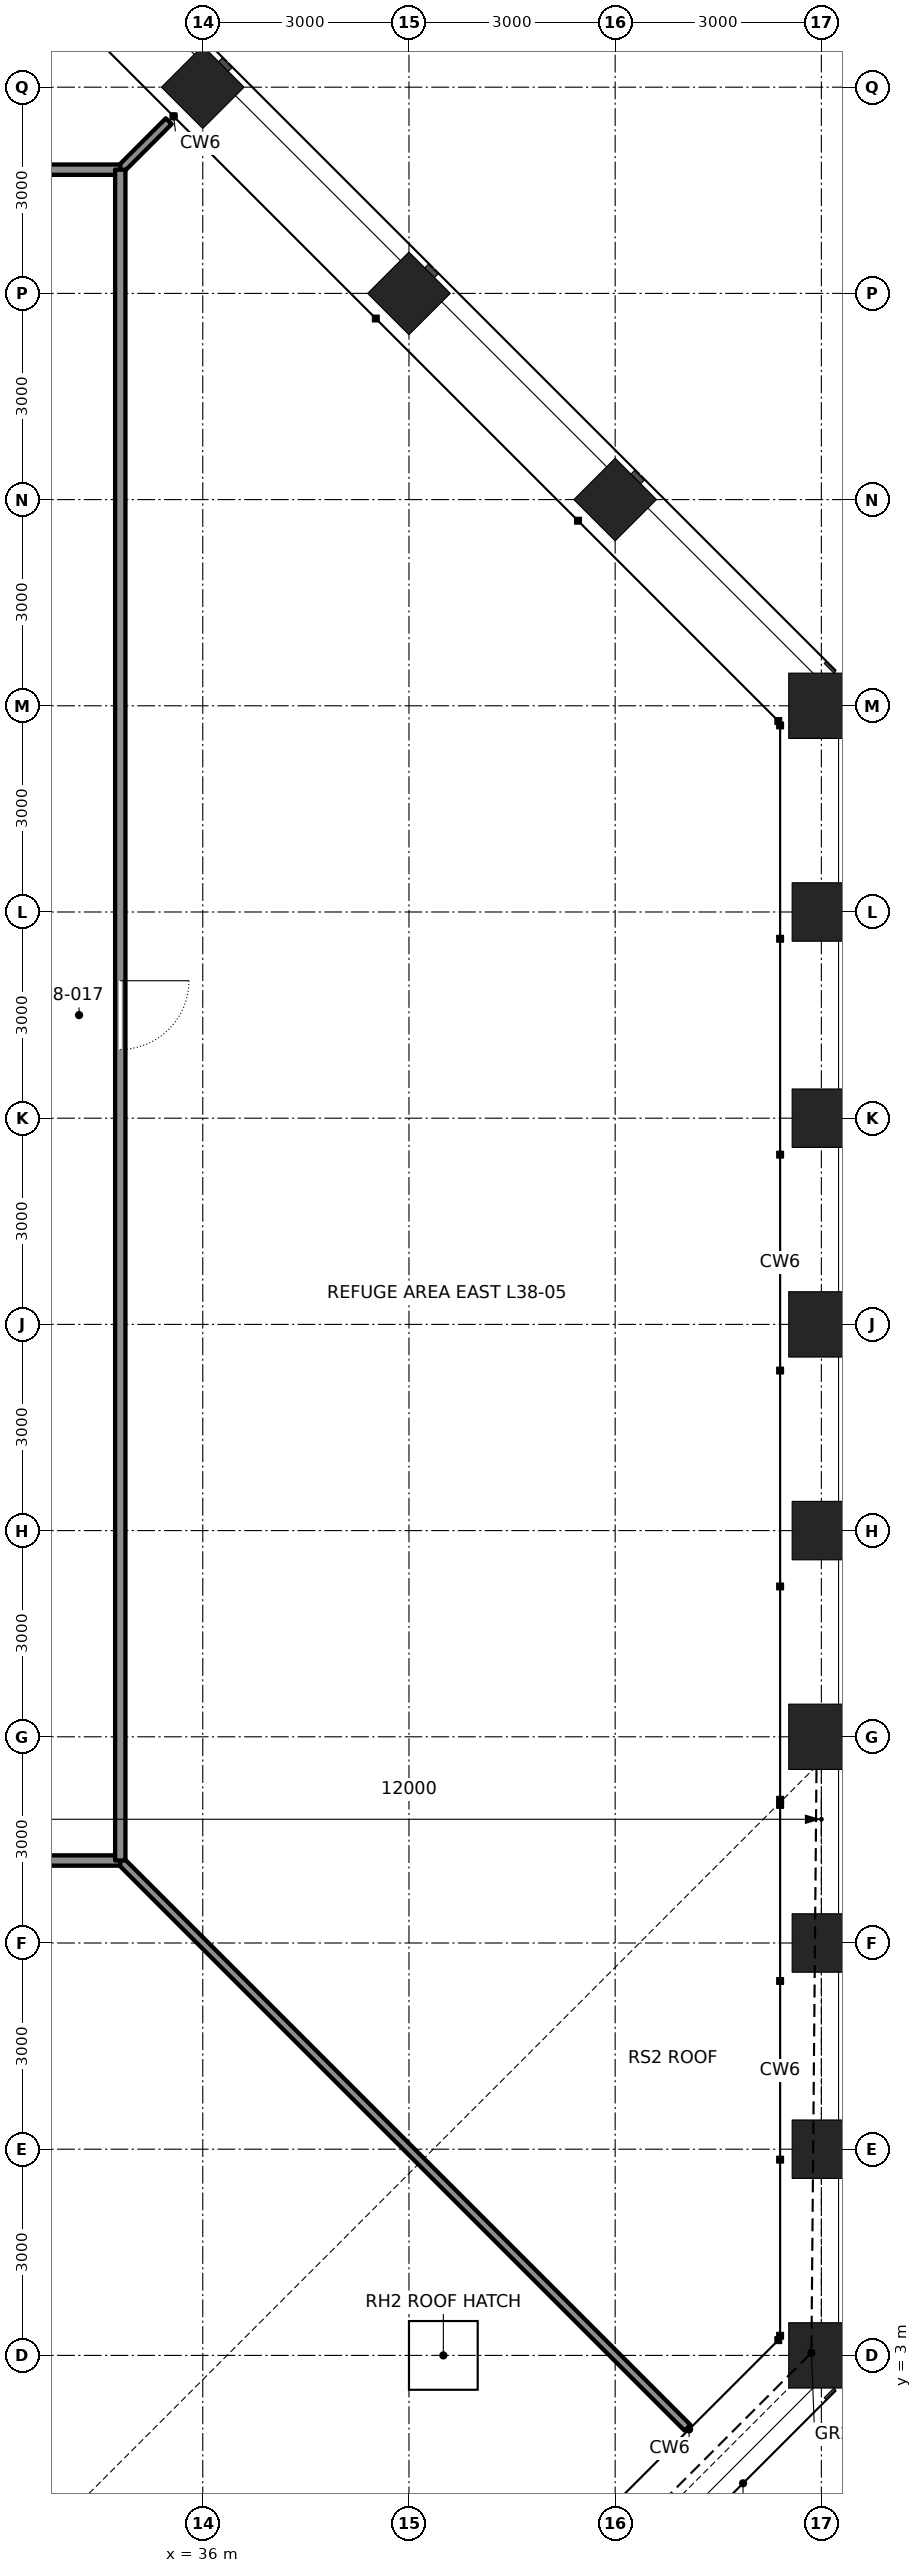
"""IFC4 building model, lengths in metres.
Left out: names, types, materials, properties, quantities, classifications, styles, units other than length and angle.
Written with IfcOpenShell. Run it as: python <this file> out.ifc"""

import sys

from ifc_helpers import new_model, si_unit, direction, frame, frame_2d, origin, origin_2d, place, context, subcontext, project, spatial, rectangle, hollow_rectangle, extrude, element, fill, save


model = new_model("IFC4")
c1 = context("Model", 3, precision=1e-05, world=origin(), true_north=direction((0.0, 1.0)))
c2 = subcontext(c1, "Body", "Model", "MODEL_VIEW")
j1 = project(units=[si_unit("LENGTHUNIT", "METRE"), si_unit("PLANEANGLEUNIT", "RADIAN")], contexts=[c1])
p1 = place(None, origin())
s1 = spatial("IfcSite", under=j1, at=p1, CompositionType="ELEMENT")
p2 = place(p1, origin())
s2 = spatial("IfcBuilding", under=s1, at=p2, CompositionType="ELEMENT")
p3 = place(p2, frame((0.0, 0.0, 174.0)))
s3 = spatial("IfcBuildingStorey", under=s2, at=p3, CompositionType="ELEMENT", Elevation=174.0)
p4 = place(p3, frame((45.0, 3.0, 0.0), z_axis=(0.0, 0.0, 1.0), x_axis=(1.0, 0.0, 0.0)))
e1 = element("IfcColumn", 1, at=p4, inside=s3, PredefinedType="COLUMN", context=c2, shape_type="SweptSolid", body=[
    extrude(hollow_rectangle(XDim=0.95, YDim=0.95, WallThickness=0.095, at=origin_2d()), origin(), (0.0, 0.0, 1.0), 3.247),
])
p5 = place(p3, frame((45.0, 6.0, 0.0), z_axis=(0.0, 0.0, 1.0), x_axis=(1.0, 0.0, 0.0)))
e2 = element("IfcColumn", 2, at=p5, inside=s3, PredefinedType="COLUMN", context=c2, shape_type="SweptSolid", body=[
    extrude(hollow_rectangle(XDim=0.85, YDim=0.85, WallThickness=0.085, at=origin_2d()), origin(), (0.0, 0.0, 1.0), 3.698),
])
p6 = place(p3, frame((45.0, 9.0, 0.0), z_axis=(0.0, 0.0, 1.0), x_axis=(1.0, 0.0, 0.0)))
e3 = element("IfcColumn", 3, at=p6, inside=s3, PredefinedType="COLUMN", context=c2, shape_type="SweptSolid", body=[
    extrude(hollow_rectangle(XDim=0.85, YDim=0.85, WallThickness=0.085, at=origin_2d()), origin(), (0.0, 0.0, 1.0), 4.149),
])
p7 = place(p3, frame((45.0, 12.0, 0.0), z_axis=(0.0, 0.0, 1.0), x_axis=(1.0, 0.0, 0.0)))
e4 = element("IfcColumn", 4, at=p7, inside=s3, PredefinedType="COLUMN", context=c2, shape_type="SweptSolid", body=[
    extrude(hollow_rectangle(XDim=0.95, YDim=0.95, WallThickness=0.11, at=origin_2d()), origin(), (0.0, 0.0, 1.0), 6.0),
])
p8 = place(p3, frame((45.0, 15.0, 0.0), z_axis=(0.0, 0.0, 1.0), x_axis=(1.0, 0.0, 0.0)))
e5 = element("IfcColumn", 5, at=p8, inside=s3, PredefinedType="COLUMN", context=c2, shape_type="SweptSolid", body=[
    extrude(hollow_rectangle(XDim=0.85, YDim=0.85, WallThickness=0.085, at=origin_2d()), origin(), (0.0, 0.0, 1.0), 6.0),
])
p9 = place(p3, frame((45.0, 18.0, 0.0), z_axis=(0.0, 0.0, 1.0), x_axis=(1.0, 0.0, 0.0)))
e6 = element("IfcColumn", 6, at=p9, inside=s3, PredefinedType="COLUMN", context=c2, shape_type="SweptSolid", body=[
    extrude(hollow_rectangle(XDim=0.95, YDim=0.95, WallThickness=0.11, at=origin_2d()), origin(), (0.0, 0.0, 1.0), 6.0),
])
for number, where, z_axis, x_axis in (
    (7, (45.0, 21.0, 0.0), (0.0, 0.0, 1.0), (1.0, 0.0, 0.0)),
    (8, (45.0, 24.0, 0.0), (0.0, 0.0, 1.0), (1.0, 0.0, 0.0)),
):
    element("IfcColumn", number, at=place(p3, frame(where, z_axis=z_axis, x_axis=x_axis)), inside=s3, PredefinedType="COLUMN", context=c2, shape_type="SweptSolid", body=[
        extrude(hollow_rectangle(XDim=0.85, YDim=0.85, WallThickness=0.085, at=origin_2d()), origin(), (0.0, 0.0, 1.0), 6.0),
    ])
p10 = place(p3, frame((45.0, 27.0, 0.0), z_axis=(0.0, 0.0, 1.0), x_axis=(1.0, 0.0, 0.0)))
e9 = element("IfcColumn", 9, at=p10, inside=s3, PredefinedType="COLUMN", context=c2, shape_type="SweptSolid", body=[
    extrude(hollow_rectangle(XDim=0.95, YDim=0.95, WallThickness=0.095, at=origin_2d()), origin(), (0.0, 0.0, 1.0), 6.0),
])
for number, where, z_axis, x_axis in (
    (10, (42.0, 30.0, 0.0), (0.0, 0.0, 1.0), (0.707, 0.707, 0.0)),
    (11, (39.0, 33.0, 0.0), (0.0, 0.0, 1.0), (0.707, 0.707, 0.0)),
    (12, (36.0, 36.0, 0.0), (0.0, 0.0, 1.0), (0.707, 0.707, 0.0)),
):
    element("IfcColumn", number, at=place(p3, frame(where, z_axis=z_axis, x_axis=x_axis)), inside=s3, PredefinedType="COLUMN", context=c2, shape_type="SweptSolid", body=[
        extrude(hollow_rectangle(XDim=0.85, YDim=0.85, WallThickness=0.085, at=origin_2d()), origin(), (0.0, 0.0, 1.0), 6.0),
    ])
p11 = place(p3, frame((34.8, 34.8, 0.0), z_axis=(0.0, 0.0, 1.0), x_axis=(0.707106781187, 0.707106781187, 0.0)))
e13 = element("IfcWall", 13, at=p11, inside=s3, PredefinedType="PARTITIONING", context=c2, shape_type="SweptSolid", body=[
    extrude(rectangle(XDim=0.997, YDim=0.12, at=frame_2d((0.499, 0.0))), origin(), (0.0, 0.0, 1.0), 5.84),
])
p12 = place(p3, frame((34.8, 10.2, 0.0), z_axis=(0.0, 0.0, 1.0), x_axis=(0.707106781187, -0.707106781187, 0.0)))
e14 = element("IfcWall", 14, at=p12, inside=s3, PredefinedType="PARTITIONING", context=c2, shape_type="SweptSolid", body=[
    extrude(rectangle(XDim=11.671, YDim=0.12, at=frame_2d((5.836, 0.0))), origin(), (0.0, 0.0, 1.0), 5.84),
])
p13 = place(p3, frame((10.2, 10.2, 0.0), z_axis=(0.0, 0.0, 1.0), x_axis=(1.0, 0.0, 0.0)))
e15 = element("IfcWall", 15, at=p13, inside=s3, PredefinedType="PARTITIONING", context=c2, shape_type="SweptSolid", body=[
    extrude(rectangle(XDim=24.6, YDim=0.15, at=frame_2d((12.3, 0.0))), origin(), (0.0, 0.0, 1.0), 5.84),
])
p14 = place(p13, frame((11.8, 0.0, 0.0)))
e16 = element("IfcOpeningElement", 16, at=p14, cuts=e15, PredefinedType="OPENING", context=c2, shape_type="SweptSolid", body=[
    extrude(rectangle(XDim=1.0, YDim=2.4, at=frame_2d((0.5, 1.2))), frame((0.0, 0.085, 0.0), z_axis=(0.0, -1.0, 0.0), x_axis=(1.0, 0.0, 0.0)), (0.0, 0.0, 1.0), 0.17),
])
p15 = place(p3, frame((10.2, 34.8, 0.0), z_axis=(0.0, 0.0, 1.0), x_axis=(1.0, 0.0, 0.0)))
e17 = element("IfcWall", 17, at=p15, inside=s3, PredefinedType="PARTITIONING", context=c2, shape_type="SweptSolid", body=[
    extrude(rectangle(XDim=24.6, YDim=0.15, at=frame_2d((12.3, 0.0))), origin(), (0.0, 0.0, 1.0), 5.84),
])
p16 = place(p15, frame((11.8, 0.0, 0.0)))
e18 = element("IfcOpeningElement", 18, at=p16, cuts=e17, PredefinedType="OPENING", context=c2, shape_type="SweptSolid", body=[
    extrude(rectangle(XDim=1.0, YDim=2.4, at=frame_2d((0.5, 1.2))), frame((0.0, 0.085, 0.0), z_axis=(0.0, -1.0, 0.0), x_axis=(1.0, 0.0, 0.0)), (0.0, 0.0, 1.0), 0.17),
])
p17 = place(p3, frame((34.8, 10.2, 0.0), z_axis=(0.0, 0.0, 1.0), x_axis=(0.0, 1.0, 0.0)))
e19 = element("IfcWall", 19, at=p17, inside=s3, PredefinedType="PARTITIONING", context=c2, shape_type="SweptSolid", body=[
    extrude(rectangle(XDim=24.6, YDim=0.15, at=frame_2d((12.3, 0.0))), origin(), (0.0, 0.0, 1.0), 5.84),
])
p18 = place(p17, frame((11.8, 0.0, 0.0)))
e20 = element("IfcOpeningElement", 20, at=p18, cuts=e19, PredefinedType="OPENING", context=c2, shape_type="SweptSolid", body=[
    extrude(rectangle(XDim=1.0, YDim=2.4, at=frame_2d((0.5, 1.2))), frame((0.0, 0.085, 0.0), z_axis=(0.0, -1.0, 0.0), x_axis=(1.0, 0.0, 0.0)), (0.0, 0.0, 1.0), 0.17),
])
p19 = place(p3, frame((39.5, 3.0, 4.969)))
p20 = place(p19, frame((0.0, 0.0, 0.454)))
e21 = element("IfcDoor", 21, at=p20, inside=s3, OperationType="SINGLE_SWING_LEFT", PredefinedType="TRAPDOOR", context=c2, shape_type="SweptSolid", body=[
    extrude(rectangle(XDim=1.0, YDim=1.0, at=origin_2d()), origin(), (0.0, 0.0, 1.0), 0.05),
])
p21 = place(p18, frame((1.0, 0.0, 0.0), z_axis=(0.0, 0.0, 1.0), x_axis=(-1.0, 0.0, 0.0)))
e22 = element("IfcDoor", 22, at=p21, inside=s3, OperationType="SINGLE_SWING_LEFT", PredefinedType="DOOR", context=c2, shape_type="SweptSolid", body=[
    extrude(rectangle(XDim=1.0, YDim=2.4, at=frame_2d((0.5, 1.2))), frame((0.0, 0.025, 0.0), z_axis=(0.0, -1.0, 0.0), x_axis=(1.0, 0.0, 0.0)), (0.0, 0.0, 1.0), 0.05),
])
fill(e20, e22)
save(model, sys.argv[1])
